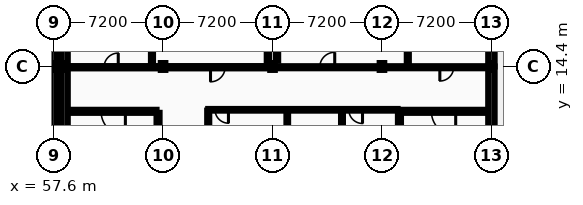
"""IFC4 building model, lengths in metres.
Left out: names, types, materials, properties, quantities, classifications, styles, units other than length and angle.
Written with IfcOpenShell. Run it as: python <this file> out.ifc"""

import sys

from ifc_helpers import new_model, si_unit, direction, frame, frame_2d, origin, origin_2d, place, context, subcontext, project, spatial, rectangle, i_section, extrude, element, fill, save


model = new_model("IFC4")
c1 = context("Model", 3, precision=1e-05, world=origin(), true_north=direction((0.0, 1.0)))
c2 = subcontext(c1, "Body", "Model", "MODEL_VIEW")
j1 = project(units=[si_unit("LENGTHUNIT", "METRE"), si_unit("PLANEANGLEUNIT", "RADIAN")], contexts=[c1])
p1 = place(None, origin())
s1 = spatial("IfcSite", under=j1, at=p1, CompositionType="ELEMENT")
p2 = place(p1, origin())
s2 = spatial("IfcBuilding", under=s1, at=p2, CompositionType="ELEMENT")
p3 = place(p2, origin())
s3 = spatial("IfcBuildingStorey", under=s2, at=p3, CompositionType="ELEMENT", Elevation=0.0)
for number, where, z_axis, x_axis in (
    (1, (57.6, 14.4, 0.0), (0.0, 0.0, 1.0), (1.0, 0.0, 0.0)),
    (2, (58.32, 14.4, 0.0), (0.0, 0.0, 1.0), (1.0, 0.0, 0.0)),
    (3, (64.8, 14.4, 0.0), (0.0, 0.0, 1.0), (1.0, 0.0, 0.0)),
    (4, (72.0, 14.4, 0.0), (0.0, 0.0, 1.0), (1.0, 0.0, 0.0)),
    (5, (79.2, 14.4, 0.0), (0.0, 0.0, 1.0), (1.0, 0.0, 0.0)),
    (6, (86.4, 14.4, 0.0), (0.0, 0.0, 1.0), (1.0, 0.0, 0.0)),
):
    element("IfcColumn", number, at=place(p3, frame(where, z_axis=z_axis, x_axis=x_axis)), inside=s3, PredefinedType="COLUMN", context=c2, shape_type="SweptSolid", body=[
        extrude(i_section(OverallWidth=0.3, OverallDepth=0.45, WebThickness=0.014, FlangeThickness=0.026, FilletRadius=0.027, at=origin_2d()), origin(), (0.0, 0.0, 1.0), 5.2),
    ])
p4 = place(p3, frame((57.6, 8.9, 0.0), z_axis=(0.0, 0.0, 1.0), x_axis=(0.0, 1.0, 0.0)))
e7 = element("IfcWall", 7, at=p4, inside=s3, PredefinedType="STANDARD", context=c2, shape_type="SweptSolid", body=[
    extrude(rectangle(XDim=5.5, YDim=0.42, at=frame_2d((2.75, 0.0))), origin(), (0.0, 0.0, 1.0), 4.97),
])
p5 = place(p3, frame((57.6, 14.4, 0.0), z_axis=(0.0, 0.0, 1.0), x_axis=(0.0, 1.0, 0.0)))
e8 = element("IfcWall", 8, at=p5, inside=s3, PredefinedType="STANDARD", context=c2, shape_type="SweptSolid", body=[
    extrude(rectangle(XDim=7.2, YDim=0.42, at=frame_2d((3.6, 0.0))), origin(), (0.0, 0.0, 1.0), 4.665),
])
p6 = place(p5, frame((1.56, 0.0, 0.95)))
e9 = element("IfcOpeningElement", 9, at=p6, cuts=e8, PredefinedType="OPENING", context=c2, shape_type="SweptSolid", body=[
    extrude(rectangle(XDim=1.2, YDim=1.296, at=frame_2d((0.6, 0.648))), frame((0.0, 0.22, 0.0), z_axis=(0.0, -1.0, 0.0), x_axis=(1.0, 0.0, 0.0)), (0.0, 0.0, 1.0), 0.44),
])
p7 = place(p5, frame((4.44, 0.0, 0.95)))
e10 = element("IfcOpeningElement", 10, at=p7, cuts=e8, PredefinedType="OPENING", context=c2, shape_type="SweptSolid", body=[
    extrude(rectangle(XDim=1.2, YDim=1.296, at=frame_2d((0.6, 0.648))), frame((0.0, 0.22, 0.0), z_axis=(0.0, -1.0, 0.0), x_axis=(1.0, 0.0, 0.0)), (0.0, 0.0, 1.0), 0.44),
])
p8 = place(p3, frame((58.32, 14.4, 0.0), z_axis=(0.0, 0.0, 1.0), x_axis=(0.0, -1.0, 0.0)))
e11 = element("IfcWall", 11, at=p8, inside=s3, PredefinedType="STANDARD", context=c2, shape_type="SweptSolid", body=[
    extrude(rectangle(XDim=5.5, YDim=0.42, at=frame_2d((2.75, 0.0))), origin(), (0.0, 0.0, 1.0), 4.97),
])
p9 = place(p3, frame((58.32, 21.6, 0.0), z_axis=(0.0, 0.0, 1.0), x_axis=(0.0, -1.0, 0.0)))
e12 = element("IfcWall", 12, at=p9, inside=s3, PredefinedType="STANDARD", context=c2, shape_type="SweptSolid", body=[
    extrude(rectangle(XDim=7.2, YDim=0.42, at=frame_2d((3.6, 0.0))), origin(), (0.0, 0.0, 1.0), 4.665),
])
p10 = place(p9, frame((1.713, 0.0, 0.95)))
e13 = element("IfcOpeningElement", 13, at=p10, cuts=e12, PredefinedType="OPENING", context=c2, shape_type="SweptSolid", body=[
    extrude(rectangle(XDim=0.894, YDim=1.26, at=frame_2d((0.447, 0.63))), frame((0.0, 0.22, 0.0), z_axis=(0.0, -1.0, 0.0), x_axis=(1.0, 0.0, 0.0)), (0.0, 0.0, 1.0), 0.44),
])
p11 = place(p9, frame((4.593, 0.0, 0.95)))
e14 = element("IfcOpeningElement", 14, at=p11, cuts=e12, PredefinedType="OPENING", context=c2, shape_type="SweptSolid", body=[
    extrude(rectangle(XDim=0.894, YDim=1.26, at=frame_2d((0.447, 0.63))), frame((0.0, 0.22, 0.0), z_axis=(0.0, -1.0, 0.0), x_axis=(1.0, 0.0, 0.0)), (0.0, 0.0, 1.0), 0.44),
])
p12 = place(p3, frame((86.4, 8.9, 0.0), z_axis=(0.0, 0.0, 1.0), x_axis=(0.0, 1.0, 0.0)))
e15 = element("IfcWall", 15, at=p12, inside=s3, PredefinedType="STANDARD", context=c2, shape_type="SweptSolid", body=[
    extrude(rectangle(XDim=5.5, YDim=0.42, at=frame_2d((2.75, 0.0))), origin(), (0.0, 0.0, 1.0), 4.97),
])
p13 = place(p3, frame((86.4, 14.4, 0.0), z_axis=(0.0, 0.0, 1.0), x_axis=(0.0, 1.0, 0.0)))
e16 = element("IfcWall", 16, at=p13, inside=s3, PredefinedType="STANDARD", context=c2, shape_type="SweptSolid", body=[
    extrude(rectangle(XDim=7.2, YDim=0.42, at=frame_2d((3.6, 0.0))), origin(), (0.0, 0.0, 1.0), 4.595),
])
p14 = place(p13, frame((1.662, 0.0, 0.95)))
e17 = element("IfcOpeningElement", 17, at=p14, cuts=e16, PredefinedType="OPENING", context=c2, shape_type="SweptSolid", body=[
    extrude(rectangle(XDim=0.996, YDim=1.26, at=frame_2d((0.498, 0.63))), frame((0.0, 0.22, 0.0), z_axis=(0.0, -1.0, 0.0), x_axis=(1.0, 0.0, 0.0)), (0.0, 0.0, 1.0), 0.44),
])
p15 = place(p13, frame((4.542, 0.0, 0.95)))
e18 = element("IfcOpeningElement", 18, at=p15, cuts=e16, PredefinedType="OPENING", context=c2, shape_type="SweptSolid", body=[
    extrude(rectangle(XDim=0.996, YDim=1.26, at=frame_2d((0.498, 0.63))), frame((0.0, 0.22, 0.0), z_axis=(0.0, -1.0, 0.0), x_axis=(1.0, 0.0, 0.0)), (0.0, 0.0, 1.0), 0.44),
])
p16 = place(p3, frame((58.67, 11.45, 0.0), z_axis=(0.0, 0.0, 1.0), x_axis=(1.0, 0.0, 0.0)))
e19 = element("IfcWall", 19, at=p16, inside=s3, PredefinedType="PARTITIONING", context=c2, shape_type="SweptSolid", body=[
    extrude(rectangle(XDim=5.7, YDim=0.2, at=frame_2d((2.85, 0.0))), origin(), (0.0, 0.0, 1.0), 4.97),
])
p17 = place(p16, frame((2.05, 0.0, 0.0)))
e20 = element("IfcOpeningElement", 20, at=p17, cuts=e19, PredefinedType="OPENING", context=c2, shape_type="SweptSolid", body=[
    extrude(rectangle(XDim=1.6, YDim=2.2, at=frame_2d((0.8, 1.1))), frame((0.0, 0.11, 0.0), z_axis=(0.0, -1.0, 0.0), x_axis=(1.0, 0.0, 0.0)), (0.0, 0.0, 1.0), 0.22),
])
p18 = place(p3, frame((64.47, 8.9, 0.0), z_axis=(0.0, 0.0, 1.0), x_axis=(0.0, 1.0, 0.0)))
e21 = element("IfcWall", 21, at=p18, inside=s3, PredefinedType="PARTITIONING", context=c2, shape_type="SweptSolid", body=[
    extrude(rectangle(XDim=2.45, YDim=0.2, at=frame_2d((1.225, 0.0))), origin(), (0.0, 0.0, 1.0), 4.97),
])
p19 = place(p3, frame((80.45, 11.45, 0.0), z_axis=(0.0, 0.0, 1.0), x_axis=(1.0, 0.0, 0.0)))
e22 = element("IfcWall", 22, at=p19, inside=s3, PredefinedType="PARTITIONING", context=c2, shape_type="SweptSolid", body=[
    extrude(rectangle(XDim=5.6, YDim=0.2, at=frame_2d((2.8, 0.0))), origin(), (0.0, 0.0, 1.0), 4.97),
])
p20 = place(p19, frame((2.0, 0.0, 0.0)))
e23 = element("IfcOpeningElement", 23, at=p20, cuts=e22, PredefinedType="OPENING", context=c2, shape_type="SweptSolid", body=[
    extrude(rectangle(XDim=1.6, YDim=2.2, at=frame_2d((0.8, 1.1))), frame((0.0, 0.11, 0.0), z_axis=(0.0, -1.0, 0.0), x_axis=(1.0, 0.0, 0.0)), (0.0, 0.0, 1.0), 0.22),
])
p21 = place(p3, frame((80.35, 8.9, 0.0), z_axis=(0.0, 0.0, 1.0), x_axis=(0.0, 1.0, 0.0)))
e24 = element("IfcWall", 24, at=p21, inside=s3, PredefinedType="PARTITIONING", context=c2, shape_type="SweptSolid", body=[
    extrude(rectangle(XDim=2.45, YDim=0.2, at=frame_2d((1.225, 0.0))), origin(), (0.0, 0.0, 1.0), 4.97),
])
p22 = place(p3, frame((67.77, 11.55, 0.0), z_axis=(0.0, 0.0, 1.0), x_axis=(1.0, 0.0, 0.0)))
e25 = element("IfcWall", 25, at=p22, inside=s3, PredefinedType="PARTITIONING", context=c2, shape_type="SweptSolid", body=[
    extrude(rectangle(XDim=12.46, YDim=0.11, at=frame_2d((6.23, 0.0))), origin(), (0.0, 0.0, 1.0), 4.97),
])
p23 = place(p22, frame((7.35, 0.0, 0.0)))
e26 = element("IfcOpeningElement", 26, at=p23, cuts=e25, PredefinedType="OPENING", context=c2, shape_type="SweptSolid", body=[
    extrude(rectangle(XDim=1.0, YDim=2.1, at=frame_2d((0.5, 1.05))), frame((0.0, 0.065, 0.0), z_axis=(0.0, -1.0, 0.0), x_axis=(1.0, 0.0, 0.0)), (0.0, 0.0, 1.0), 0.13),
])
p24 = place(p22, frame((9.25, 0.0, 0.0)))
e27 = element("IfcOpeningElement", 27, at=p24, cuts=e25, PredefinedType="OPENING", context=c2, shape_type="SweptSolid", body=[
    extrude(rectangle(XDim=0.9, YDim=2.1, at=frame_2d((0.45, 1.05))), frame((0.0, 0.065, 0.0), z_axis=(0.0, -1.0, 0.0), x_axis=(1.0, 0.0, 0.0)), (0.0, 0.0, 1.0), 0.13),
])
p25 = place(p22, frame((0.45, 0.0, 0.0)))
e28 = element("IfcOpeningElement", 28, at=p25, cuts=e25, PredefinedType="OPENING", context=c2, shape_type="SweptSolid", body=[
    extrude(rectangle(XDim=0.88, YDim=2.096, at=frame_2d((0.44, 1.048))), frame((0.0, 0.065, 0.0), z_axis=(0.0, -1.0, 0.0), x_axis=(1.0, 0.0, 0.0)), (0.0, 0.0, 1.0), 0.13),
])
p26 = place(p3, frame((58.7, 14.35, 0.0), z_axis=(0.0, 0.0, 1.0), x_axis=(1.0, 0.0, 0.0)))
e29 = element("IfcWall", 29, at=p26, inside=s3, PredefinedType="PARTITIONING", context=c2, shape_type="SweptSolid", body=[
    extrude(rectangle(XDim=5.72, YDim=0.15, at=frame_2d((2.86, 0.0))), origin(), (0.0, 0.0, 1.0), 4.665),
])
p27 = place(p26, frame((2.219, 0.0, 0.0)))
e30 = element("IfcOpeningElement", 30, at=p27, cuts=e29, PredefinedType="OPENING", context=c2, shape_type="SweptSolid", body=[
    extrude(rectangle(XDim=0.932, YDim=2.096, at=frame_2d((0.466, 1.048))), frame((0.0, 0.085, 0.0), z_axis=(0.0, -1.0, 0.0), x_axis=(1.0, 0.0, 0.0)), (0.0, 0.0, 1.0), 0.17),
])
p28 = place(p3, frame((65.18, 14.35, 0.0), z_axis=(0.0, 0.0, 1.0), x_axis=(1.0, 0.0, 0.0)))
e31 = element("IfcWall", 31, at=p28, inside=s3, PredefinedType="PARTITIONING", context=c2, shape_type="SweptSolid", body=[
    extrude(rectangle(XDim=6.44, YDim=0.15, at=frame_2d((3.22, 0.0))), origin(), (0.0, 0.0, 1.0), 4.665),
])
p29 = place(p28, frame((2.741, 0.0, 0.0)))
e32 = element("IfcOpeningElement", 32, at=p29, cuts=e31, PredefinedType="OPENING", context=c2, shape_type="SweptSolid", body=[
    extrude(rectangle(XDim=0.958, YDim=2.096, at=frame_2d((0.479, 1.048))), frame((0.0, 0.085, 0.0), z_axis=(0.0, -1.0, 0.0), x_axis=(1.0, 0.0, 0.0)), (0.0, 0.0, 1.0), 0.17),
])
p30 = place(p3, frame((72.38, 14.35, 0.0), z_axis=(0.0, 0.0, 1.0), x_axis=(1.0, 0.0, 0.0)))
e33 = element("IfcWall", 33, at=p30, inside=s3, PredefinedType="PARTITIONING", context=c2, shape_type="SweptSolid", body=[
    extrude(rectangle(XDim=6.44, YDim=0.135, at=frame_2d((3.22, 0.0))), origin(), (0.0, 0.0, 1.0), 4.665),
])
p31 = place(p30, frame((2.728, 0.0, 0.0)))
e34 = element("IfcOpeningElement", 34, at=p31, cuts=e33, PredefinedType="OPENING", context=c2, shape_type="SweptSolid", body=[
    extrude(rectangle(XDim=0.984, YDim=2.096, at=frame_2d((0.492, 1.048))), frame((0.0, 0.078, 0.0), z_axis=(0.0, -1.0, 0.0), x_axis=(1.0, 0.0, 0.0)), (0.0, 0.0, 1.0), 0.155),
])
p32 = place(p3, frame((79.58, 14.35, 0.0), z_axis=(0.0, 0.0, 1.0), x_axis=(1.0, 0.0, 0.0)))
e35 = element("IfcWall", 35, at=p32, inside=s3, PredefinedType="PARTITIONING", context=c2, shape_type="SweptSolid", body=[
    extrude(rectangle(XDim=6.44, YDim=0.135, at=frame_2d((3.22, 0.0))), origin(), (0.0, 0.0, 1.0), 4.665),
])
p33 = place(p32, frame((3.427, 0.0, 0.0)))
e36 = element("IfcOpeningElement", 36, at=p33, cuts=e35, PredefinedType="OPENING", context=c2, shape_type="SweptSolid", body=[
    extrude(rectangle(XDim=0.906, YDim=2.096, at=frame_2d((0.453, 1.048))), frame((0.0, 0.078, 0.0), z_axis=(0.0, -1.0, 0.0), x_axis=(1.0, 0.0, 0.0)), (0.0, 0.0, 1.0), 0.155),
])
p34 = place(p3, frame((64.07, 14.425, 0.0), z_axis=(0.0, 0.0, 1.0), x_axis=(0.0, 1.0, 0.0)))
e37 = element("IfcWall", 37, at=p34, inside=s3, PredefinedType="PARTITIONING", context=c2, shape_type="SweptSolid", body=[
    extrude(rectangle(XDim=14.175, YDim=0.135, at=frame_2d((7.087, 0.0))), origin(), (0.0, 0.0, 1.0), 4.97),
])
p35 = place(p3, frame((67.77, 3.36, 0.0), z_axis=(0.0, 0.0, 1.0), x_axis=(0.0, 1.0, 0.0)))
e38 = element("IfcWall", 38, at=p35, inside=s3, PredefinedType="PARTITIONING", context=c2, shape_type="SweptSolid", body=[
    extrude(rectangle(XDim=8.135, YDim=0.135, at=frame_2d((4.067, 0.0))), origin(), (0.0, 0.0, 1.0), 4.97),
])
p36 = place(p3, frame((71.7, 14.78, 0.0), z_axis=(0.0, 0.0, 1.0), x_axis=(0.0, 1.0, 0.0)))
e39 = element("IfcWall", 39, at=p36, inside=s3, PredefinedType="PARTITIONING", context=c2, shape_type="SweptSolid", body=[
    extrude(rectangle(XDim=6.44, YDim=0.16, at=frame_2d((3.22, 0.0))), origin(), (0.0, 0.0, 1.0), 4.665),
])
p37 = place(p3, frame((72.3, 14.78, 0.0), z_axis=(0.0, 0.0, 1.0), x_axis=(0.0, 1.0, 0.0)))
e40 = element("IfcWall", 40, at=p37, inside=s3, PredefinedType="PARTITIONING", context=c2, shape_type="SweptSolid", body=[
    extrude(rectangle(XDim=6.44, YDim=0.142, at=frame_2d((3.22, 0.0))), origin(), (0.0, 0.0, 1.0), 4.665),
])
p38 = place(p3, frame((72.97, 0.2, 0.0), z_axis=(0.0, 0.0, 1.0), x_axis=(0.0, 1.0, 0.0)))
e41 = element("IfcWall", 41, at=p38, inside=s3, PredefinedType="PARTITIONING", context=c2, shape_type="SweptSolid", body=[
    extrude(rectangle(XDim=11.295, YDim=0.11, at=frame_2d((5.647, 0.0))), origin(), (0.0, 0.0, 1.0), 4.97),
])
p39 = place(p3, frame((76.57, 0.2, 0.0), z_axis=(0.0, 0.0, 1.0), x_axis=(0.0, 1.0, 0.0)))
e42 = element("IfcWall", 42, at=p39, inside=s3, PredefinedType="PARTITIONING", context=c2, shape_type="SweptSolid", body=[
    extrude(rectangle(XDim=11.295, YDim=0.125, at=frame_2d((5.647, 0.0))), origin(), (0.0, 0.0, 1.0), 4.97),
])
p40 = place(p3, frame((80.9, 14.417, 0.0), z_axis=(0.0, 0.0, 1.0), x_axis=(0.0, 1.0, 0.0)))
e43 = element("IfcWall", 43, at=p40, inside=s3, PredefinedType="PARTITIONING", context=c2, shape_type="SweptSolid", body=[
    extrude(rectangle(XDim=14.183, YDim=0.135, at=frame_2d((7.091, 0.0))), origin(), (0.0, 0.0, 1.0), 4.97),
])
p41 = place(p17, origin())
e44 = element("IfcDoor", 44, at=p41, inside=s3, OperationType="DOUBLE_DOOR_SINGLE_SWING", PredefinedType="DOOR", context=c2, shape_type="SweptSolid", body=[
    extrude(rectangle(XDim=1.6, YDim=2.2, at=frame_2d((0.8, 1.1))), frame((0.0, 0.025, 0.0), z_axis=(0.0, -1.0, 0.0), x_axis=(1.0, 0.0, 0.0)), (0.0, 0.0, 1.0), 0.05),
])
fill(e20, e44)
p42 = place(p20, origin())
e45 = element("IfcDoor", 45, at=p42, inside=s3, OperationType="DOUBLE_DOOR_SINGLE_SWING", PredefinedType="DOOR", context=c2, shape_type="SweptSolid", body=[
    extrude(rectangle(XDim=1.6, YDim=2.2, at=frame_2d((0.8, 1.1))), frame((0.0, 0.025, 0.0), z_axis=(0.0, -1.0, 0.0), x_axis=(1.0, 0.0, 0.0)), (0.0, 0.0, 1.0), 0.05),
])
fill(e23, e45)
p43 = place(p23, origin())
e46 = element("IfcDoor", 46, at=p43, inside=s3, OperationType="SLIDING_TO_LEFT", PredefinedType="DOOR", context=c2, shape_type="SweptSolid", body=[
    extrude(rectangle(XDim=1.0, YDim=2.1, at=frame_2d((0.5, 1.05))), frame((0.0, 0.025, 0.0), z_axis=(0.0, -1.0, 0.0), x_axis=(1.0, 0.0, 0.0)), (0.0, 0.0, 1.0), 0.05),
])
fill(e26, e46)
p44 = place(p24, origin())
e47 = element("IfcDoor", 47, at=p44, inside=s3, OperationType="SINGLE_SWING_RIGHT", PredefinedType="DOOR", context=c2, shape_type="SweptSolid", body=[
    extrude(rectangle(XDim=0.9, YDim=2.1, at=frame_2d((0.45, 1.05))), frame((0.0, 0.025, 0.0), z_axis=(0.0, -1.0, 0.0), x_axis=(1.0, 0.0, 0.0)), (0.0, 0.0, 1.0), 0.05),
])
fill(e27, e47)
p45 = place(p25, origin())
e48 = element("IfcDoor", 48, at=p45, inside=s3, OperationType="SINGLE_SWING_RIGHT", PredefinedType="DOOR", context=c2, shape_type="SweptSolid", body=[
    extrude(rectangle(XDim=0.88, YDim=2.096, at=frame_2d((0.44, 1.048))), frame((0.0, 0.025, 0.0), z_axis=(0.0, -1.0, 0.0), x_axis=(1.0, 0.0, 0.0)), (0.0, 0.0, 1.0), 0.05),
])
fill(e28, e48)
p46 = place(p33, frame((0.906, 0.0, 0.0), z_axis=(0.0, 0.0, 1.0), x_axis=(-1.0, 0.0, 0.0)))
e49 = element("IfcDoor", 49, at=p46, inside=s3, OperationType="SINGLE_SWING_LEFT", PredefinedType="DOOR", context=c2, shape_type="SweptSolid", body=[
    extrude(rectangle(XDim=0.906, YDim=2.096, at=frame_2d((0.453, 1.048))), frame((0.0, 0.025, 0.0), z_axis=(0.0, -1.0, 0.0), x_axis=(1.0, 0.0, 0.0)), (0.0, 0.0, 1.0), 0.05),
])
fill(e36, e49)
p47 = place(p27, frame((0.932, 0.0, 0.0), z_axis=(0.0, 0.0, 1.0), x_axis=(-1.0, 0.0, 0.0)))
e50 = element("IfcDoor", 50, at=p47, inside=s3, OperationType="SINGLE_SWING_RIGHT", PredefinedType="DOOR", context=c2, shape_type="SweptSolid", body=[
    extrude(rectangle(XDim=0.932, YDim=2.096, at=frame_2d((0.466, 1.048))), frame((0.0, 0.025, 0.0), z_axis=(0.0, -1.0, 0.0), x_axis=(1.0, 0.0, 0.0)), (0.0, 0.0, 1.0), 0.05),
])
fill(e30, e50)
p48 = place(p29, frame((0.958, 0.0, 0.0), z_axis=(0.0, 0.0, 1.0), x_axis=(-1.0, 0.0, 0.0)))
e51 = element("IfcDoor", 51, at=p48, inside=s3, OperationType="SINGLE_SWING_LEFT", PredefinedType="DOOR", context=c2, shape_type="SweptSolid", body=[
    extrude(rectangle(XDim=0.958, YDim=2.096, at=frame_2d((0.479, 1.048))), frame((0.0, 0.025, 0.0), z_axis=(0.0, -1.0, 0.0), x_axis=(1.0, 0.0, 0.0)), (0.0, 0.0, 1.0), 0.05),
])
fill(e32, e51)
p49 = place(p31, frame((0.984, 0.0, 0.0), z_axis=(0.0, 0.0, 1.0), x_axis=(-1.0, 0.0, 0.0)))
e52 = element("IfcDoor", 52, at=p49, inside=s3, OperationType="SINGLE_SWING_RIGHT", PredefinedType="DOOR", context=c2, shape_type="SweptSolid", body=[
    extrude(rectangle(XDim=0.984, YDim=2.096, at=frame_2d((0.492, 1.048))), frame((0.0, 0.025, 0.0), z_axis=(0.0, -1.0, 0.0), x_axis=(1.0, 0.0, 0.0)), (0.0, 0.0, 1.0), 0.05),
])
fill(e34, e52)
save(model, sys.argv[1])
